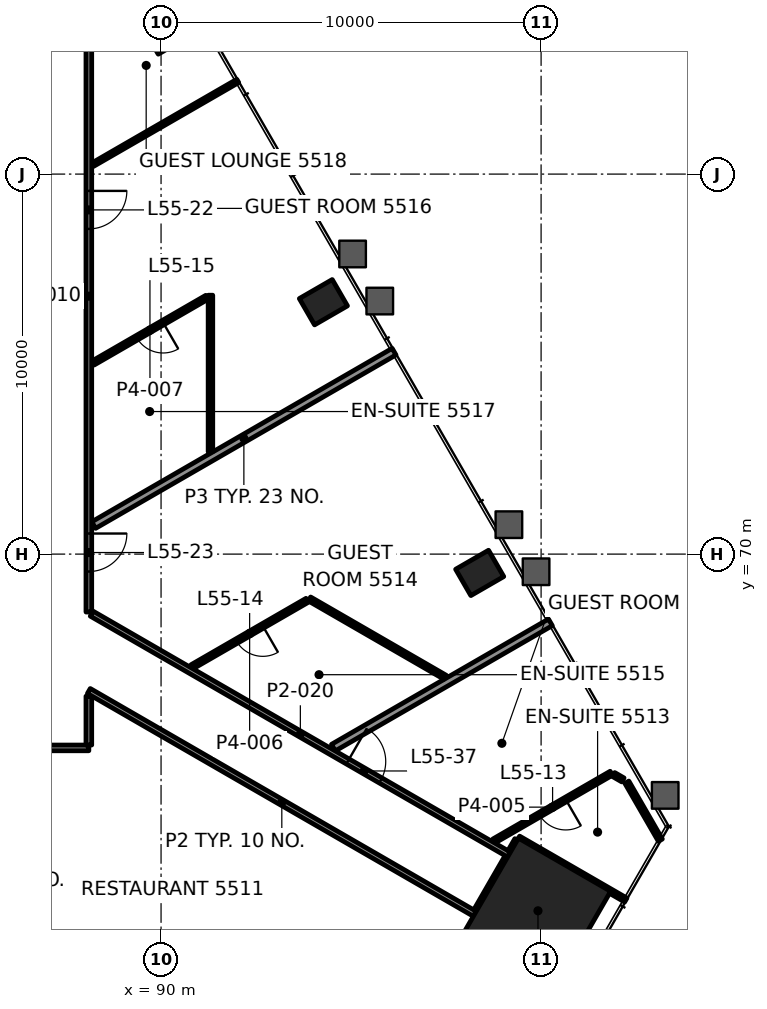
"""IFC4 building model, lengths in metres.
Left out: names, types, materials, properties, quantities, classifications, styles, units other than length and angle.
Written with IfcOpenShell. Run it as: python <this file> out.ifc"""

import sys

from ifc_helpers import new_model, si_unit, direction, frame, frame_2d, origin, origin_2d, place, context, subcontext, project, spatial, rectangle, hollow_rectangle, extrude, element, fill, save


model = new_model("IFC4")
c1 = context("Model", 3, precision=1e-05, world=origin(), true_north=direction((0.0, 1.0)))
c2 = subcontext(c1, "Body", "Model", "MODEL_VIEW")
j1 = project(units=[si_unit("LENGTHUNIT", "METRE"), si_unit("PLANEANGLEUNIT", "RADIAN")], contexts=[c1])
p1 = place(None, origin())
s1 = spatial("IfcSite", under=j1, at=p1, CompositionType="ELEMENT")
p2 = place(p1, origin())
s2 = spatial("IfcBuilding", under=s1, at=p2, CompositionType="ELEMENT")
p3 = place(p2, frame((0.0, 0.0, 233.8)))
s3 = spatial("IfcBuildingStorey", under=s2, at=p3, CompositionType="ELEMENT", Elevation=233.8)
p4 = place(p3, frame((99.918, 60.614, 0.0), z_axis=(0.0, 0.0, 1.0), x_axis=(0.5, 0.866025403784, 0.0)))
e1 = element("IfcColumn", 1, at=p4, inside=s3, PredefinedType="COLUMN", context=c2, shape_type="SweptSolid", body=[
    extrude(rectangle(XDim=2.8, YDim=2.8, at=origin_2d()), origin(), (0.0, 0.0, 1.0), 3.9),
])
for number, where, z_axis, x_axis in (
    (2, (98.385, 69.505, -0.0), (0.0, 0.0, 1.0), (-0.5, 0.866, 0.0)),
    (3, (94.272, 76.628, -0.0), (0.0, 0.0, 1.0), (-0.5, 0.866, 0.0)),
    (4, (90.159, 83.752, -0.0), (0.0, 0.0, 1.0), (-0.5, 0.866, 0.0)),
):
    element("IfcColumn", number, at=place(p3, frame(where, z_axis=z_axis, x_axis=x_axis)), inside=s3, PredefinedType="COLUMN", context=c2, shape_type="SweptSolid", body=[
        extrude(hollow_rectangle(XDim=0.8, YDim=1.0, WallThickness=0.05, at=origin_2d()), origin(), (0.0, 0.0, 1.0), 3.9),
    ])
p5 = place(p3, frame((88.099, 64.9, 0.0), z_axis=(0.0, 0.0, 1.0), x_axis=(-1.0, 0.0, 0.0)))
e5 = element("IfcWall", 5, at=p5, inside=s3, PredefinedType="PARTITIONING", context=c2, shape_type="SweptSolid", body=[
    extrude(rectangle(XDim=26.199, YDim=0.15, at=frame_2d((13.1, 0.0))), origin(), (0.0, 0.0, 1.0), 3.1),
])
p6 = place(p5, frame((2.088, 0.0, 0.0)))
e6 = element("IfcOpeningElement", 6, at=p6, cuts=e5, PredefinedType="OPENING", context=c2, shape_type="SweptSolid", body=[
    extrude(rectangle(XDim=0.9, YDim=2.1, at=frame_2d((0.45, 1.05))), frame((0.0, 0.085, 0.0), z_axis=(0.0, -1.0, 0.0), x_axis=(1.0, 0.0, 0.0)), (0.0, 0.0, 1.0), 0.17),
])
p7 = place(p5, frame((5.4, 0.0, 0.0)))
e7 = element("IfcOpeningElement", 7, at=p7, cuts=e5, PredefinedType="OPENING", context=c2, shape_type="SweptSolid", body=[
    extrude(rectangle(XDim=1.0, YDim=2.1, at=frame_2d((0.5, 1.05))), frame((0.0, 0.085, 0.0), z_axis=(0.0, -1.0, 0.0), x_axis=(1.0, 0.0, 0.0)), (0.0, 0.0, 1.0), 0.17),
])
p8 = place(p5, frame((17.946, 0.0, 0.0)))
e8 = element("IfcOpeningElement", 8, at=p8, cuts=e5, PredefinedType="OPENING", context=c2, shape_type="SweptSolid", body=[
    extrude(rectangle(XDim=1.0, YDim=2.1, at=frame_2d((0.5, 1.05))), frame((0.0, 0.085, 0.0), z_axis=(0.0, -1.0, 0.0), x_axis=(1.0, 0.0, 0.0)), (0.0, 0.0, 1.0), 0.17),
])
p9 = place(p5, frame((24.395, 0.0, 0.0)))
e9 = element("IfcOpeningElement", 9, at=p9, cuts=e5, PredefinedType="OPENING", context=c2, shape_type="SweptSolid", body=[
    extrude(rectangle(XDim=1.0, YDim=2.1, at=frame_2d((0.5, 1.05))), frame((0.0, 0.085, 0.0), z_axis=(0.0, -1.0, 0.0), x_axis=(1.0, 0.0, 0.0)), (0.0, 0.0, 1.0), 0.17),
])
p10 = place(p3, frame((101.848, 64.234, 0.0), z_axis=(0.0, 0.0, 1.0), x_axis=(-0.865998731726, -0.500046194516, 0.0)))
e10 = element("IfcWall", 10, at=p10, inside=s3, PredefinedType="PARTITIONING", context=c2, shape_type="SweptSolid", body=[
    extrude(rectangle(XDim=3.569, YDim=0.12, at=frame_2d((1.784, 0.0))), origin(), (0.0, 0.0, 1.0), 3.1),
])
p11 = place(p10, frame((1.384, 0.0, 0.0)))
e11 = element("IfcOpeningElement", 11, at=p11, cuts=e10, PredefinedType="OPENING", context=c2, shape_type="SweptSolid", body=[
    extrude(rectangle(XDim=0.8, YDim=2.1, at=frame_2d((0.4, 1.05))), frame((0.0, 0.07, 0.0), z_axis=(0.0, -1.0, 0.0), x_axis=(1.0, 0.0, 0.0)), (0.0, 0.0, 1.0), 0.14),
])
p12 = place(p3, frame((94.535, 64.907, 0.0), z_axis=(0.0, 0.0, 1.0), x_axis=(0.866024015056, 0.50000240534, 0.0)))
e12 = element("IfcWall", 12, at=p12, inside=s3, PredefinedType="PARTITIONING", context=c2, shape_type="SweptSolid", body=[
    extrude(rectangle(XDim=6.593, YDim=0.2, at=frame_2d((3.296, 0.0))), origin(), (0.0, 0.0, 1.0), 3.1),
])
p13 = place(p3, frame((93.846, 68.784, 0.0), z_axis=(0.0, 0.0, 1.0), x_axis=(-0.865997352085, -0.500048583822, 0.0)))
e13 = element("IfcWall", 13, at=p13, inside=s3, PredefinedType="PARTITIONING", context=c2, shape_type="SweptSolid", body=[
    extrude(rectangle(XDim=3.499, YDim=0.12, at=frame_2d((1.75, 0.0))), origin(), (0.0, 0.0, 1.0), 3.1),
])
p14 = place(p13, frame((1.35, 0.0, 0.0)))
e14 = element("IfcOpeningElement", 14, at=p14, cuts=e13, PredefinedType="OPENING", context=c2, shape_type="SweptSolid", body=[
    extrude(rectangle(XDim=0.8, YDim=2.1, at=frame_2d((0.4, 1.05))), frame((0.0, 0.07, 0.0), z_axis=(0.0, -1.0, 0.0), x_axis=(1.0, 0.0, 0.0)), (0.0, 0.0, 1.0), 0.14),
])
p15 = place(p3, frame((88.227, 70.764, 0.0), z_axis=(0.0, 0.0, 1.0), x_axis=(0.866028789565, 0.499994135611, 0.0)))
e15 = element("IfcWall", 15, at=p15, inside=s3, PredefinedType="PARTITIONING", context=c2, shape_type="SweptSolid", body=[
    extrude(rectangle(XDim=9.127, YDim=0.2, at=frame_2d((4.563, 0.0))), origin(), (0.0, 0.0, 1.0), 3.022),
])
p16 = place(p3, frame((91.206, 76.757, 0.0), z_axis=(0.0, 0.0, 1.0), x_axis=(-0.866028087245, -0.499995352082, 0.0)))
e16 = element("IfcWall", 16, at=p16, inside=s3, PredefinedType="PARTITIONING", context=c2, shape_type="SweptSolid", body=[
    extrude(rectangle(XDim=3.459, YDim=0.12, at=frame_2d((1.729, 0.0))), origin(), (0.0, 0.0, 1.0), 3.1),
])
p17 = place(p16, frame((1.33, 0.0, 0.0)))
e17 = element("IfcOpeningElement", 17, at=p17, cuts=e16, PredefinedType="OPENING", context=c2, shape_type="SweptSolid", body=[
    extrude(rectangle(XDim=0.8, YDim=2.1, at=frame_2d((0.4, 1.05))), frame((0.0, 0.07, 0.0), z_axis=(0.0, -1.0, 0.0), x_axis=(1.0, 0.0, 0.0)), (0.0, 0.0, 1.0), 0.14),
])
p18 = place(p3, frame((88.201, 80.248, 0.0), z_axis=(0.0, 0.0, 1.0), x_axis=(0.866050012359, 0.499957374277, 0.0)))
e18 = element("IfcWall", 18, at=p18, inside=s3, PredefinedType="PARTITIONING", context=c2, shape_type="SweptSolid", body=[
    extrude(rectangle(XDim=4.408, YDim=0.1, at=frame_2d((2.204, 0.0))), origin(), (0.0, 0.0, 1.0), 3.022),
])
p19 = place(p3, frame((98.293, 60.6, 0.0), z_axis=(0.0, 0.0, 1.0), x_axis=(0.499927431592, 0.866067297121, 0.0)))
e19 = element("IfcWall", 19, at=p19, inside=s3, PredefinedType="PARTITIONING", context=c2, shape_type="SweptSolid", body=[
    extrude(rectangle(XDim=1.65, YDim=0.15, at=frame_2d((0.825, 0.0))), origin(), (0.0, 0.0, 1.0), 2.947),
])
p20 = place(p3, frame((91.3, 72.694, 0.0), z_axis=(0.0, 0.0, 1.0), x_axis=(0.0, 1.0, 0.0)))
e20 = element("IfcWall", 20, at=p20, inside=s3, PredefinedType="PARTITIONING", context=c2, shape_type="SweptSolid", body=[
    extrude(rectangle(XDim=4.118, YDim=0.12, at=frame_2d((2.059, 0.0))), origin(), (0.0, 0.0, 1.0), 3.1),
])
p21 = place(p3, frame((88.1, 64.976, 0.0), z_axis=(0.0, 0.0, 1.0), x_axis=(0.0, 1.0, 0.0)))
e21 = element("IfcWall", 21, at=p21, inside=s3, PredefinedType="PARTITIONING", context=c2, shape_type="SweptSolid", body=[
    extrude(rectangle(XDim=1.285, YDim=0.15, at=frame_2d((0.643, 0.0))), origin(), (0.0, 0.0, 1.0), 2.947),
])
p22 = place(p3, frame((88.1, 85.1, 0.0), z_axis=(0.0, 0.0, 1.0), x_axis=(0.0, -1.0, 0.0)))
e22 = element("IfcWall", 22, at=p22, inside=s3, PredefinedType="PARTITIONING", context=c2, shape_type="SweptSolid", body=[
    extrude(rectangle(XDim=16.624, YDim=0.15, at=frame_2d((8.312, 0.0))), origin(), (0.0, 0.0, 1.0), 3.1),
])
p23 = place(p22, frame((5.542, 0.0, 0.0)))
e23 = element("IfcOpeningElement", 23, at=p23, cuts=e22, PredefinedType="OPENING", context=c2, shape_type="SweptSolid", body=[
    extrude(rectangle(XDim=1.0, YDim=2.1, at=frame_2d((0.5, 1.05))), frame((0.0, 0.085, 0.0), z_axis=(0.0, -1.0, 0.0), x_axis=(1.0, 0.0, 0.0)), (0.0, 0.0, 1.0), 0.17),
])
p24 = place(p22, frame((14.558, 0.0, 0.0)))
e24 = element("IfcOpeningElement", 24, at=p24, cuts=e22, PredefinedType="OPENING", context=c2, shape_type="SweptSolid", body=[
    extrude(rectangle(XDim=1.0, YDim=2.1, at=frame_2d((0.5, 1.05))), frame((0.0, 0.085, 0.0), z_axis=(0.0, -1.0, 0.0), x_axis=(1.0, 0.0, 0.0)), (0.0, 0.0, 1.0), 0.17),
])
p25 = place(p3, frame((103.138, 62.471, 0.0), z_axis=(0.0, 0.0, 1.0), x_axis=(-0.499998282143, 0.866026395587, 0.0)))
e25 = element("IfcWall", 25, at=p25, inside=s3, PredefinedType="PARTITIONING", context=c2, shape_type="SweptSolid", body=[
    extrude(rectangle(XDim=1.762, YDim=0.12, at=frame_2d((0.881, 0.0))), origin(), (0.0, 0.0, 1.0), 3.1),
])
p26 = place(p3, frame((102.153, 64.058, 0.0), z_axis=(0.0, 0.0, 1.0), x_axis=(-0.866113839764, 0.499846793097, 0.0)))
e26 = element("IfcWall", 26, at=p26, inside=s3, PredefinedType="PARTITIONING", context=c2, shape_type="SweptSolid", body=[
    extrude(rectangle(XDim=0.283, YDim=0.12, at=frame_2d((0.142, 0.0))), origin(), (0.0, 0.0, 1.0), 3.1),
])
p27 = place(p3, frame((97.473, 66.76, 0.0), z_axis=(0.0, 0.0, 1.0), x_axis=(-0.866027647951, 0.499996112969, 0.0)))
e27 = element("IfcWall", 27, at=p27, inside=s3, PredefinedType="PARTITIONING", context=c2, shape_type="SweptSolid", body=[
    extrude(rectangle(XDim=4.119, YDim=0.12, at=frame_2d((2.059, 0.0))), origin(), (0.0, 0.0, 1.0), 3.1),
])
p28 = place(p3, frame((102.229, 60.896, 0.0), z_axis=(0.0, 0.0, 1.0), x_axis=(-0.866054628924, 0.499949377157, 0.0)))
e28 = element("IfcWall", 28, at=p28, inside=s3, PredefinedType="PARTITIONING", context=c2, shape_type="SweptSolid", body=[
    extrude(rectangle(XDim=3.26, YDim=0.12, at=frame_2d((1.63, 0.0))), origin(), (0.0, 0.0, 1.0), 3.1),
])
p29 = place(p3, frame((88.175, 68.433, 0.0), z_axis=(0.0, 0.0, 1.0), x_axis=(0.866028141608, -0.499995257921, 0.0)))
e29 = element("IfcWall", 29, at=p29, inside=s3, PredefinedType="PARTITIONING", context=c2, shape_type="SweptSolid", body=[
    extrude(rectangle(XDim=12.679, YDim=0.15, at=frame_2d((6.339, 0.0))), origin(), (0.0, 0.0, 1.0), 3.1),
])
p30 = place(p29, frame((7.779, 0.0, 0.0)))
e30 = element("IfcOpeningElement", 30, at=p30, cuts=e29, PredefinedType="OPENING", context=c2, shape_type="SweptSolid", body=[
    extrude(rectangle(XDim=1.0, YDim=2.1, at=frame_2d((0.5, 1.05))), frame((0.0, 0.085, 0.0), z_axis=(0.0, -1.0, 0.0), x_axis=(1.0, 0.0, 0.0)), (0.0, 0.0, 1.0), 0.17),
])
p31 = place(p3, frame((98.255, 60.535, 0.0), z_axis=(0.0, 0.0, 1.0), x_axis=(-0.866028172479, 0.49999520445, 0.0)))
e31 = element("IfcWall", 31, at=p31, inside=s3, PredefinedType="PARTITIONING", context=c2, shape_type="SweptSolid", body=[
    extrude(rectangle(XDim=11.726, YDim=0.15, at=frame_2d((5.863, 0.0))), origin(), (0.0, 0.0, 1.0), 2.947),
])
p32 = place(p3, frame((99.192, 62.158, 0.0), z_axis=(0.0, 0.0, 1.0), x_axis=(0.500534336868, 0.865716684381, 0.0)))
e32 = element("IfcWall", 32, at=p32, inside=s3, PredefinedType="PARTITIONING", context=c2, shape_type="SweptSolid", body=[
    extrude(rectangle(XDim=0.364, YDim=0.15, at=frame_2d((0.182, 0.0))), origin(), (0.0, 0.0, 1.0), 3.1),
])
p33 = place(p11, origin())
e33 = element("IfcDoor", 33, at=p33, inside=s3, OperationType="SINGLE_SWING_LEFT", PredefinedType="DOOR", context=c2, shape_type="SweptSolid", body=[
    extrude(rectangle(XDim=0.8, YDim=2.1, at=frame_2d((0.4, 1.05))), frame((0.0, 0.025, 0.0), z_axis=(0.0, -1.0, 0.0), x_axis=(1.0, 0.0, 0.0)), (0.0, 0.0, 1.0), 0.05),
])
fill(e11, e33)
p34 = place(p14, origin())
e34 = element("IfcDoor", 34, at=p34, inside=s3, OperationType="SINGLE_SWING_LEFT", PredefinedType="DOOR", context=c2, shape_type="SweptSolid", body=[
    extrude(rectangle(XDim=0.8, YDim=2.1, at=frame_2d((0.4, 1.05))), frame((0.0, 0.025, 0.0), z_axis=(0.0, -1.0, 0.0), x_axis=(1.0, 0.0, 0.0)), (0.0, 0.0, 1.0), 0.05),
])
fill(e14, e34)
p35 = place(p17, origin())
e35 = element("IfcDoor", 35, at=p35, inside=s3, OperationType="SINGLE_SWING_LEFT", PredefinedType="DOOR", context=c2, shape_type="SweptSolid", body=[
    extrude(rectangle(XDim=0.8, YDim=2.1, at=frame_2d((0.4, 1.05))), frame((0.0, 0.025, 0.0), z_axis=(0.0, -1.0, 0.0), x_axis=(1.0, 0.0, 0.0)), (0.0, 0.0, 1.0), 0.05),
])
fill(e17, e35)
p36 = place(p23, origin())
e36 = element("IfcDoor", 36, at=p36, inside=s3, OperationType="SINGLE_SWING_RIGHT", PredefinedType="DOOR", context=c2, shape_type="SweptSolid", body=[
    extrude(rectangle(XDim=1.0, YDim=2.1, at=frame_2d((0.5, 1.05))), frame((0.0, 0.025, 0.0), z_axis=(0.0, -1.0, 0.0), x_axis=(1.0, 0.0, 0.0)), (0.0, 0.0, 1.0), 0.05),
])
fill(e23, e36)
p37 = place(p24, origin())
e37 = element("IfcDoor", 37, at=p37, inside=s3, OperationType="SINGLE_SWING_RIGHT", PredefinedType="DOOR", context=c2, shape_type="SweptSolid", body=[
    extrude(rectangle(XDim=1.0, YDim=2.1, at=frame_2d((0.5, 1.05))), frame((0.0, 0.025, 0.0), z_axis=(0.0, -1.0, 0.0), x_axis=(1.0, 0.0, 0.0)), (0.0, 0.0, 1.0), 0.05),
])
fill(e24, e37)
p38 = place(p30, origin())
e38 = element("IfcDoor", 38, at=p38, inside=s3, OperationType="SINGLE_SWING_RIGHT", PredefinedType="DOOR", context=c2, shape_type="SweptSolid", body=[
    extrude(rectangle(XDim=1.0, YDim=2.1, at=frame_2d((0.5, 1.05))), frame((0.0, 0.025, 0.0), z_axis=(0.0, -1.0, 0.0), x_axis=(1.0, 0.0, 0.0)), (0.0, 0.0, 1.0), 0.05),
])
fill(e30, e38)
p39 = place(p3, origin())
p40 = place(p39, frame((101.97, 65.245, 0.15), z_axis=(0.0, 0.0, 1.0), x_axis=(-0.5, 0.866025, 0.0)))
p41 = place(p40, origin())
e39 = element("IfcWindow", 39, at=p41, inside=s3, PartitioningType="SINGLE_PANEL", PredefinedType="WINDOW", context=c2, shape_type="SweptSolid", body=[
    extrude(rectangle(XDim=2.667, YDim=3.55, at=frame_2d((1.333, 1.775))), frame((0.0, 0.03, 0.0), z_axis=(0.0, -1.0, 0.0), x_axis=(1.0, 0.0, 0.0)), (0.0, 0.0, 1.0), 0.06),
])
save(model, sys.argv[1])
